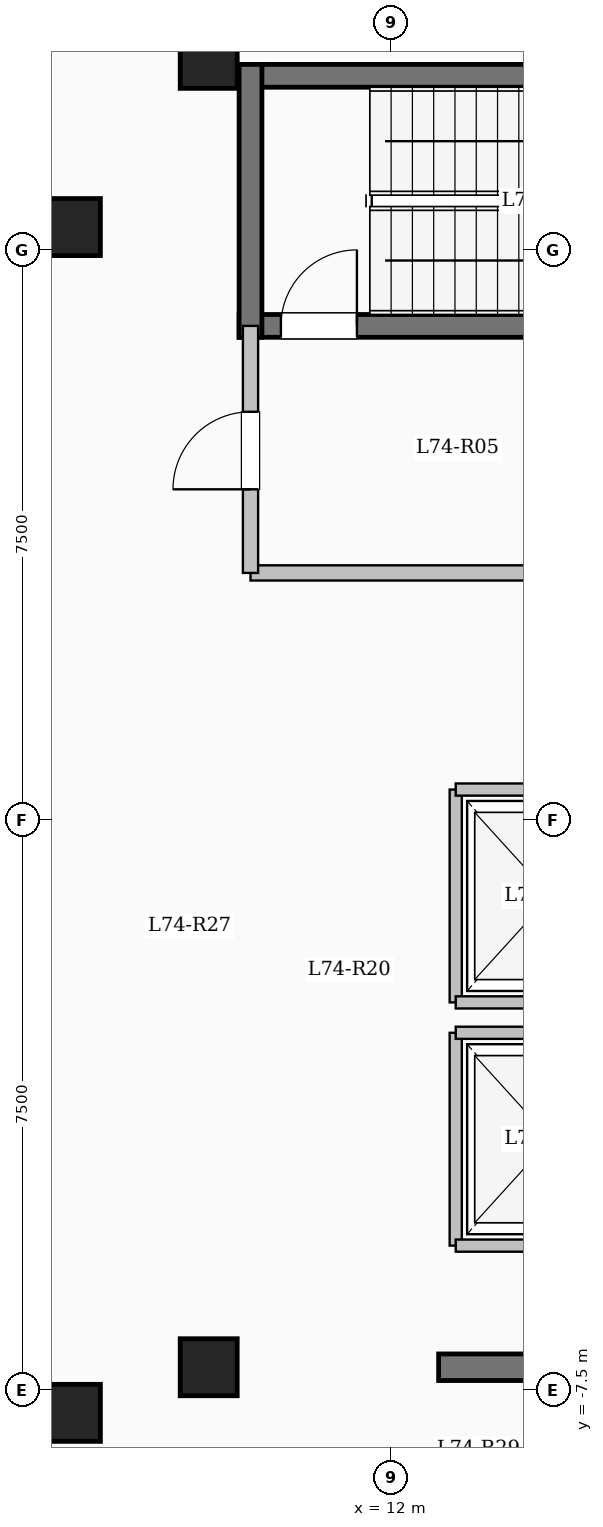
"""IFC4 building model, lengths in metres.
Left out: names, types, materials, properties, quantities, classifications, styles, units other than length and angle.
Written with IfcOpenShell. Run it as: python <this file> out.ifc"""

import sys

from ifc_helpers import new_model, si_unit, direction, frame, frame_2d, origin, origin_2d, place, context, subcontext, project, spatial, rectangle, extrude, element, fill, save


model = new_model("IFC4")
c1 = context("Model", 3, precision=1e-05, world=origin(), true_north=direction((0.0, 1.0)))
c2 = subcontext(c1, "Body", "Model", "MODEL_VIEW")
j1 = project(units=[si_unit("LENGTHUNIT", "METRE"), si_unit("PLANEANGLEUNIT", "RADIAN")], contexts=[c1])
p1 = place(None, origin())
s1 = spatial("IfcSite", under=j1, at=p1, CompositionType="ELEMENT")
p2 = place(p1, origin())
s2 = spatial("IfcBuilding", under=s1, at=p2, CompositionType="ELEMENT")
p3 = place(p2, frame((0.0, 0.0, 271.65)))
s3 = spatial("IfcBuildingStorey", under=s2, at=p3, CompositionType="ELEMENT", Elevation=271.65)
for number, where, z_axis, x_axis in (
    (1, (7.8, -7.8, 0.0), (0.0, 0.0, 1.0), (1.0, 0.0, 0.0)),
    (2, (7.8, 7.8, 0.0), (0.0, 0.0, 1.0), (1.0, 0.0, 0.0)),
    (3, (9.6, -7.2, 0.0), (0.0, 0.0, 1.0), (1.0, 0.0, 0.0)),
    (4, (9.6, 10.0, 0.0), (0.0, 0.0, 1.0), (1.0, 0.0, 0.0)),
):
    element("IfcColumn", number, at=place(p3, frame(where, z_axis=z_axis, x_axis=x_axis)), inside=s3, PredefinedType="COLUMN", context=c2, shape_type="SweptSolid", body=[
        extrude(rectangle(XDim=0.75, YDim=0.75, at=origin_2d()), origin(), (0.0, 0.0, 1.0), 4.65),
    ])
p4 = place(p3, frame((10.0, 9.79, 0.0), z_axis=(0.0, 0.0, 1.0), x_axis=(1.0, 0.0, 0.0)))
e5 = element("IfcWall", 5, at=p4, inside=s3, PredefinedType="SHEAR", context=c2, shape_type="SweptSolid", body=[
    extrude(rectangle(XDim=8.0, YDim=0.3, at=frame_2d((4.0, 0.0))), origin(), (0.0, 0.0, 1.0), 4.65),
])
p5 = place(p3, frame((10.0, 6.5, 0.0), z_axis=(0.0, 0.0, 1.0), x_axis=(1.0, 0.0, 0.0)))
e6 = element("IfcWall", 6, at=p5, inside=s3, PredefinedType="SHEAR", context=c2, shape_type="SweptSolid", body=[
    extrude(rectangle(XDim=8.0, YDim=0.3, at=frame_2d((4.0, 0.0))), origin(), (0.0, 0.0, 1.0), 4.65),
])
p6 = place(p5, frame((0.55, 0.0, 0.0)))
e7 = element("IfcOpeningElement", 7, at=p6, cuts=e6, PredefinedType="OPENING", context=c2, shape_type="SweptSolid", body=[
    extrude(rectangle(XDim=1.0, YDim=2.15, at=frame_2d((0.5, 1.075))), frame((0.0, 0.16, 0.0), z_axis=(0.0, -1.0, 0.0), x_axis=(1.0, 0.0, 0.0)), (0.0, 0.0, 1.0), 0.32),
])
p7 = place(p3, frame((10.15, 6.35, 0.0), z_axis=(0.0, 0.0, 1.0), x_axis=(0.0, 1.0, 0.0)))
e8 = element("IfcWall", 8, at=p7, inside=s3, PredefinedType="SHEAR", context=c2, shape_type="SweptSolid", body=[
    extrude(rectangle(XDim=3.59, YDim=0.3, at=frame_2d((1.795, 0.0))), origin(), (0.0, 0.0, 1.0), 4.65),
])
p8 = place(p3, frame((10.15, 3.25, 0.0), z_axis=(0.0, 0.0, 1.0), x_axis=(1.0, 0.0, 0.0)))
e9 = element("IfcWall", 9, at=p8, inside=s3, PredefinedType="SOLIDWALL", context=c2, shape_type="SweptSolid", body=[
    extrude(rectangle(XDim=5.4, YDim=0.2, at=frame_2d((2.7, 0.0))), origin(), (0.0, 0.0, 1.0), 4.35),
])
p9 = place(p3, frame((10.15, 3.25, 0.0), z_axis=(0.0, 0.0, 1.0), x_axis=(0.0, 1.0, 0.0)))
e10 = element("IfcWall", 10, at=p9, inside=s3, PredefinedType="SOLIDWALL", context=c2, shape_type="SweptSolid", body=[
    extrude(rectangle(XDim=3.25, YDim=0.2, at=frame_2d((1.625, 0.0))), origin(), (0.0, 0.0, 1.0), 4.35),
])
p10 = place(p9, frame((1.1, 0.0, 0.0)))
e11 = element("IfcOpeningElement", 11, at=p10, cuts=e10, PredefinedType="OPENING", context=c2, shape_type="SweptSolid", body=[
    extrude(rectangle(XDim=1.02, YDim=2.15, at=frame_2d((0.51, 1.075))), frame((0.0, 0.11, 0.0), z_axis=(0.0, -1.0, 0.0), x_axis=(1.0, 0.0, 0.0)), (0.0, 0.0, 1.0), 0.22),
])
p11 = place(p3, frame((12.85, -5.6, 0.0), z_axis=(0.0, 0.0, 1.0), x_axis=(0.0, 1.0, 0.0)))
e12 = element("IfcWall", 12, at=p11, inside=s3, PredefinedType="SOLIDWALL", context=c2, shape_type="SweptSolid", body=[
    extrude(rectangle(XDim=2.8, YDim=0.16, at=frame_2d((1.4, 0.0))), origin(), (0.0, 0.0, 1.0), 4.35),
])
for number, where, z_axis, x_axis in (
    (13, (12.85, -5.6, 0.0), (0.0, 0.0, 1.0), (1.0, 0.0, 0.0)),
    (14, (12.85, -2.8, 0.0), (0.0, 0.0, 1.0), (1.0, 0.0, 0.0)),
):
    element("IfcWall", number, at=place(p3, frame(where, z_axis=z_axis, x_axis=x_axis)), inside=s3, PredefinedType="SOLIDWALL", context=c2, shape_type="SweptSolid", body=[
        extrude(rectangle(XDim=2.5, YDim=0.16, at=frame_2d((1.25, 0.0))), origin(), (0.0, 0.0, 1.0), 4.35),
    ])
p12 = place(p3, frame((12.85, -2.4, 0.0), z_axis=(0.0, 0.0, 1.0), x_axis=(0.0, 1.0, 0.0)))
e15 = element("IfcWall", 15, at=p12, inside=s3, PredefinedType="SOLIDWALL", context=c2, shape_type="SweptSolid", body=[
    extrude(rectangle(XDim=2.8, YDim=0.16, at=frame_2d((1.4, 0.0))), origin(), (0.0, 0.0, 1.0), 4.35),
])
for number, where, z_axis, x_axis in (
    (16, (12.85, -2.4, 0.0), (0.0, 0.0, 1.0), (1.0, 0.0, 0.0)),
    (17, (12.85, 0.4, 0.0), (0.0, 0.0, 1.0), (1.0, 0.0, 0.0)),
):
    element("IfcWall", number, at=place(p3, frame(where, z_axis=z_axis, x_axis=x_axis)), inside=s3, PredefinedType="SOLIDWALL", context=c2, shape_type="SweptSolid", body=[
        extrude(rectangle(XDim=2.5, YDim=0.16, at=frame_2d((1.25, 0.0))), origin(), (0.0, 0.0, 1.0), 4.35),
    ])
p13 = place(p3, frame((12.625, -7.2, 0.0), z_axis=(0.0, 0.0, 1.0), x_axis=(1.0, 0.0, 0.0)))
e18 = element("IfcWall", 18, at=p13, inside=s3, PredefinedType="SHEAR", context=c2, shape_type="SweptSolid", body=[
    extrude(rectangle(XDim=6.0, YDim=0.35, at=frame_2d((3.0, 0.0))), origin(), (0.0, 0.0, 1.0), 4.65),
])
p14 = place(p13, frame((4.4, 0.0, 0.0)))
e19 = element("IfcOpeningElement", 19, at=p14, cuts=e18, PredefinedType="OPENING", context=c2, shape_type="SweptSolid", body=[
    extrude(rectangle(XDim=1.12, YDim=2.15, at=frame_2d((0.56, 1.075))), frame((0.0, 0.185, 0.0), z_axis=(0.0, -1.0, 0.0), x_axis=(1.0, 0.0, 0.0)), (0.0, 0.0, 1.0), 0.37),
])
p15 = place(p6, origin())
e20 = element("IfcDoor", 20, at=p15, inside=s3, OperationType="SINGLE_SWING_RIGHT", PredefinedType="DOOR", context=c2, shape_type="SweptSolid", body=[
    extrude(rectangle(XDim=1.0, YDim=2.15, at=frame_2d((0.5, 1.075))), frame((0.0, 0.025, 0.0), z_axis=(0.0, -1.0, 0.0), x_axis=(1.0, 0.0, 0.0)), (0.0, 0.0, 1.0), 0.05),
])
fill(e7, e20)
p16 = place(p10, origin())
e21 = element("IfcDoor", 21, at=p16, inside=s3, OperationType="SINGLE_SWING_LEFT", PredefinedType="DOOR", context=c2, shape_type="SweptSolid", body=[
    extrude(rectangle(XDim=1.02, YDim=2.15, at=frame_2d((0.51, 1.075))), frame((0.0, 0.025, 0.0), z_axis=(0.0, -1.0, 0.0), x_axis=(1.0, 0.0, 0.0)), (0.0, 0.0, 1.0), 0.05),
])
fill(e11, e21)
save(model, sys.argv[1])
